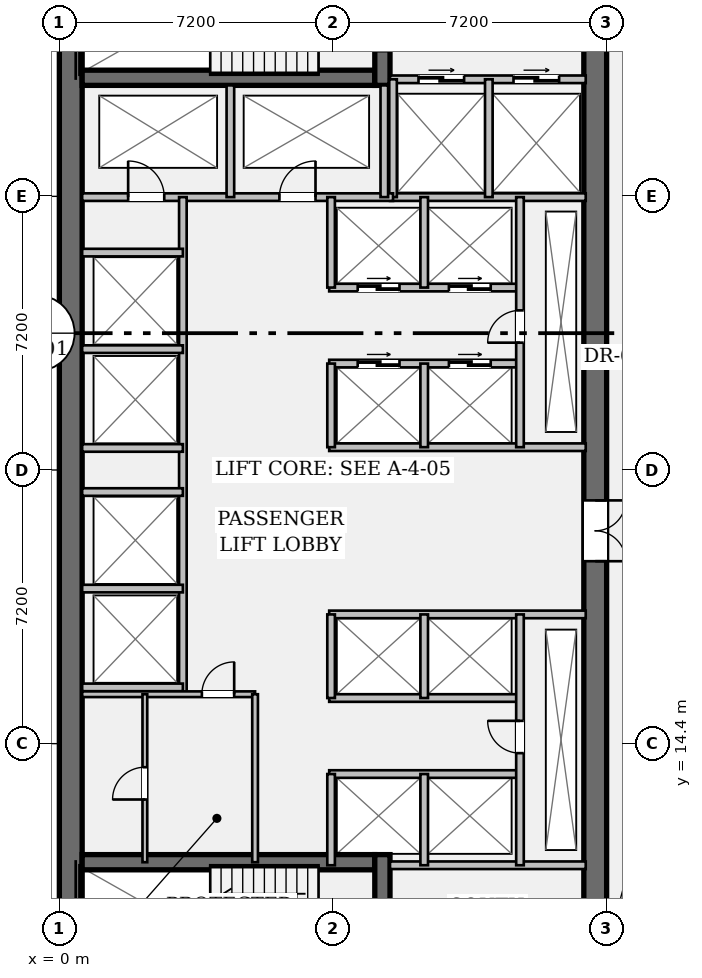
"""IFC4 building model, lengths in metres.
Left out: names, types, materials, properties, quantities, classifications, styles, units other than length and angle.
Written with IfcOpenShell. Run it as: python <this file> out.ifc"""

import sys

from ifc_helpers import new_model, si_unit, direction, frame, frame_2d, origin, place, context, subcontext, project, spatial, rectangle, extrude, element, fill, save


model = new_model("IFC4")
c1 = context("Model", 3, precision=1e-05, world=origin(), true_north=direction((0.0, 1.0)))
c2 = subcontext(c1, "Body", "Model", "MODEL_VIEW")
j1 = project(units=[si_unit("LENGTHUNIT", "METRE"), si_unit("PLANEANGLEUNIT", "RADIAN")], contexts=[c1])
p1 = place(None, origin())
s1 = spatial("IfcSite", under=j1, at=p1, CompositionType="ELEMENT")
p2 = place(p1, origin())
s2 = spatial("IfcBuilding", under=s1, at=p2, CompositionType="ELEMENT")
p3 = place(p2, frame((0.0, 0.0, 69.65)))
s3 = spatial("IfcBuildingStorey", under=s2, at=p3, CompositionType="ELEMENT", Elevation=69.65)
p4 = place(p3, frame((0.3, 7.2, 0.0), z_axis=(0.0, 0.0, 1.0), x_axis=(0.0, 1.0, 0.0)))
e1 = element("IfcWall", 1, at=p4, inside=s3, PredefinedType="SHEAR", context=c2, shape_type="SweptSolid", body=[
    extrude(rectangle(XDim=28.8, YDim=0.6, at=frame_2d((14.4, 0.0))), origin(), (0.0, 0.0, 1.0), 3.57),
])
p5 = place(p3, frame((14.1, 35.4, 0.0), z_axis=(0.0, 0.0, 1.0), x_axis=(0.0, -1.0, 0.0)))
e2 = element("IfcWall", 2, at=p5, inside=s3, PredefinedType="SHEAR", context=c2, shape_type="SweptSolid", body=[
    extrude(rectangle(XDim=27.6, YDim=0.6, at=frame_2d((13.8, 0.0))), origin(), (0.0, 0.0, 1.0), 3.57),
])
p6 = place(p5, frame((1.3, 0.0, 0.0)))
e3 = element("IfcOpeningElement", 3, at=p6, cuts=e2, PredefinedType="OPENING", context=c2, shape_type="SweptSolid", body=[
    extrude(rectangle(XDim=1.2, YDim=2.15, at=frame_2d((0.6, 1.075))), frame((0.0, 0.312, 0.0), z_axis=(0.0, -1.0, 0.0), x_axis=(1.0, 0.0, 0.0)), (0.0, 0.0, 1.0), 0.624),
])
p7 = place(p5, frame((25.25, 0.0, 0.0)))
e4 = element("IfcOpeningElement", 4, at=p7, cuts=e2, PredefinedType="OPENING", context=c2, shape_type="SweptSolid", body=[
    extrude(rectangle(XDim=1.2, YDim=2.15, at=frame_2d((0.6, 1.075))), frame((0.0, 0.312, 0.0), z_axis=(0.0, -1.0, 0.0), x_axis=(1.0, 0.0, 0.0)), (0.0, 0.0, 1.0), 0.624),
])
p8 = place(p5, frame((14.6, 0.0, 0.0)))
e5 = element("IfcOpeningElement", 5, at=p8, cuts=e2, PredefinedType="OPENING", context=c2, shape_type="SweptSolid", body=[
    extrude(rectangle(XDim=1.6, YDim=2.2, at=frame_2d((0.8, 1.1))), frame((0.0, 0.312, 0.0), z_axis=(0.0, -1.0, 0.0), x_axis=(1.0, 0.0, 0.0)), (0.0, 0.0, 1.0), 0.624),
])
for number, where, z_axis, x_axis in (
    (6, (0.6, 31.92, 0.0), (0.0, 0.0, 1.0), (1.0, 0.0, 0.0)),
    (7, (0.6, 11.28, 0.0), (0.0, 0.0, 1.0), (1.0, 0.0, 0.0)),
):
    element("IfcWall", number, at=place(p3, frame(where, z_axis=z_axis, x_axis=x_axis)), inside=s3, PredefinedType="SHEAR", context=c2, shape_type="SweptSolid", body=[
        extrude(rectangle(XDim=7.7, YDim=0.4, at=frame_2d((3.85, 0.0))), origin(), (0.0, 0.0, 1.0), 3.57),
    ])
p9 = place(p3, frame((8.5, 31.72, 0.0), z_axis=(0.0, 0.0, 1.0), x_axis=(0.0, 1.0, 0.0)))
e8 = element("IfcWall", 8, at=p9, inside=s3, PredefinedType="SHEAR", context=c2, shape_type="SweptSolid", body=[
    extrude(rectangle(XDim=3.68, YDim=0.4, at=frame_2d((1.84, 0.0))), origin(), (0.0, 0.0, 1.0), 3.57),
])
p10 = place(p9, frame((0.9, 0.0, 0.0)))
e9 = element("IfcOpeningElement", 9, at=p10, cuts=e8, PredefinedType="OPENING", context=c2, shape_type="SweptSolid", body=[
    extrude(rectangle(XDim=1.1, YDim=2.15, at=frame_2d((0.55, 1.075))), frame((0.0, 0.212, 0.0), z_axis=(0.0, -1.0, 0.0), x_axis=(1.0, 0.0, 0.0)), (0.0, 0.0, 1.0), 0.424),
])
p11 = place(p3, frame((8.5, 7.8, 0.0), z_axis=(0.0, 0.0, 1.0), x_axis=(0.0, 1.0, 0.0)))
e10 = element("IfcWall", 10, at=p11, inside=s3, PredefinedType="SHEAR", context=c2, shape_type="SweptSolid", body=[
    extrude(rectangle(XDim=3.68, YDim=0.4, at=frame_2d((1.84, 0.0))), origin(), (0.0, 0.0, 1.0), 3.57),
])
p12 = place(p11, frame((0.85, 0.0, 0.0)))
e11 = element("IfcOpeningElement", 11, at=p12, cuts=e10, PredefinedType="OPENING", context=c2, shape_type="SweptSolid", body=[
    extrude(rectangle(XDim=1.1, YDim=2.15, at=frame_2d((0.55, 1.075))), frame((0.0, 0.212, 0.0), z_axis=(0.0, -1.0, 0.0), x_axis=(1.0, 0.0, 0.0)), (0.0, 0.0, 1.0), 0.424),
])
p13 = place(p3, frame((8.7, 31.88, 0.0), z_axis=(0.0, 0.0, 1.0), x_axis=(1.0, 0.0, 0.0)))
e12 = element("IfcWall", 12, at=p13, inside=s3, PredefinedType="PARTITIONING", context=c2, shape_type="SweptSolid", body=[
    extrude(rectangle(XDim=5.15, YDim=0.2, at=frame_2d((2.575, 0.0))), origin(), (0.0, 0.0, 1.0), 3.57),
])
p14 = place(p13, frame((0.75, 0.0, 0.0)))
e13 = element("IfcOpeningElement", 13, at=p14, cuts=e12, PredefinedType="OPENING", context=c2, shape_type="SweptSolid", body=[
    extrude(rectangle(XDim=1.2, YDim=2.2, at=frame_2d((0.6, 1.1))), frame((0.0, 0.112, 0.0), z_axis=(0.0, -1.0, 0.0), x_axis=(1.0, 0.0, 0.0)), (0.0, 0.0, 1.0), 0.224),
])
p15 = place(p13, frame((3.25, 0.0, 0.0)))
e14 = element("IfcOpeningElement", 14, at=p15, cuts=e12, PredefinedType="OPENING", context=c2, shape_type="SweptSolid", body=[
    extrude(rectangle(XDim=1.2, YDim=2.2, at=frame_2d((0.6, 1.1))), frame((0.0, 0.112, 0.0), z_axis=(0.0, -1.0, 0.0), x_axis=(1.0, 0.0, 0.0)), (0.0, 0.0, 1.0), 0.224),
])
for number, where, z_axis, x_axis in (
    (15, (8.7, 11.2, 0.0), (0.0, 0.0, 1.0), (1.0, 0.0, 0.0)),
    (16, (8.7, 28.78, 0.0), (0.0, 0.0, 1.0), (1.0, 0.0, 0.0)),
):
    element("IfcWall", number, at=place(p3, frame(where, z_axis=z_axis, x_axis=x_axis)), inside=s3, PredefinedType="PARTITIONING", context=c2, shape_type="SweptSolid", body=[
        extrude(rectangle(XDim=5.15, YDim=0.2, at=frame_2d((2.575, 0.0))), origin(), (0.0, 0.0, 1.0), 3.57),
    ])
for number, where, z_axis, x_axis in (
    (17, (8.78, 28.78, 0.0), (0.0, 0.0, 1.0), (0.0, 1.0, 0.0)),
    (18, (11.3, 28.78, 0.0), (0.0, 0.0, 1.0), (0.0, 1.0, 0.0)),
):
    element("IfcWall", number, at=place(p3, frame(where, z_axis=z_axis, x_axis=x_axis)), inside=s3, PredefinedType="PARTITIONING", context=c2, shape_type="SweptSolid", body=[
        extrude(rectangle(XDim=3.1, YDim=0.2, at=frame_2d((1.55, 0.0))), origin(), (0.0, 0.0, 1.0), 3.57),
    ])
p16 = place(p3, frame((0.6, 28.78, 0.0), z_axis=(0.0, 0.0, 1.0), x_axis=(1.0, 0.0, 0.0)))
e19 = element("IfcWall", 19, at=p16, inside=s3, PredefinedType="PARTITIONING", context=c2, shape_type="SweptSolid", body=[
    extrude(rectangle(XDim=8.18, YDim=0.2, at=frame_2d((4.09, 0.0))), origin(), (0.0, 0.0, 1.0), 3.57),
])
p17 = place(p16, frame((1.21, 0.0, 0.0)))
e20 = element("IfcOpeningElement", 20, at=p17, cuts=e19, PredefinedType="OPENING", context=c2, shape_type="SweptSolid", body=[
    extrude(rectangle(XDim=0.95, YDim=2.15, at=frame_2d((0.475, 1.075))), frame((0.0, 0.112, 0.0), z_axis=(0.0, -1.0, 0.0), x_axis=(1.0, 0.0, 0.0)), (0.0, 0.0, 1.0), 0.224),
])
p18 = place(p16, frame((5.19, 0.0, 0.0)))
e21 = element("IfcOpeningElement", 21, at=p18, cuts=e19, PredefinedType="OPENING", context=c2, shape_type="SweptSolid", body=[
    extrude(rectangle(XDim=0.95, YDim=2.15, at=frame_2d((0.475, 1.075))), frame((0.0, 0.112, 0.0), z_axis=(0.0, -1.0, 0.0), x_axis=(1.0, 0.0, 0.0)), (0.0, 0.0, 1.0), 0.224),
])
for number, where, z_axis, x_axis in (
    (22, (4.5, 28.78, 0.0), (0.0, 0.0, 1.0), (0.0, 1.0, 0.0)),
    (23, (8.55, 28.78, 0.0), (0.0, 0.0, 1.0), (0.0, 1.0, 0.0)),
):
    element("IfcWall", number, at=place(p3, frame(where, z_axis=z_axis, x_axis=x_axis)), inside=s3, PredefinedType="PARTITIONING", context=c2, shape_type="SweptSolid", body=[
        extrude(rectangle(XDim=2.94, YDim=0.2, at=frame_2d((1.47, 0.0))), origin(), (0.0, 0.0, 1.0), 3.57),
    ])
p19 = place(p3, frame((3.25, 15.7, 0.0), z_axis=(0.0, 0.0, 1.0), x_axis=(0.0, 1.0, 0.0)))
e24 = element("IfcWall", 24, at=p19, inside=s3, PredefinedType="PARTITIONING", context=c2, shape_type="SweptSolid", body=[
    extrude(rectangle(XDim=13.08, YDim=0.2, at=frame_2d((6.54, 0.0))), origin(), (0.0, 0.0, 1.0), 3.57),
])
for number, where, z_axis, x_axis in (
    (25, (0.6, 15.88, 0.0), (0.0, 0.0, 1.0), (1.0, 0.0, 0.0)),
    (26, (0.6, 18.48, 0.0), (0.0, 0.0, 1.0), (1.0, 0.0, 0.0)),
    (27, (0.6, 22.18, 0.0), (0.0, 0.0, 1.0), (1.0, 0.0, 0.0)),
    (28, (0.6, 24.78, 0.0), (0.0, 0.0, 1.0), (1.0, 0.0, 0.0)),
    (29, (0.6, 21.02, 0.0), (0.0, 0.0, 1.0), (1.0, 0.0, 0.0)),
    (30, (0.6, 27.32, 0.0), (0.0, 0.0, 1.0), (1.0, 0.0, 0.0)),
):
    element("IfcWall", number, at=place(p3, frame(where, z_axis=z_axis, x_axis=x_axis)), inside=s3, PredefinedType="PARTITIONING", context=c2, shape_type="SweptSolid", body=[
        extrude(rectangle(XDim=2.65, YDim=0.2, at=frame_2d((1.325, 0.0))), origin(), (0.0, 0.0, 1.0), 3.57),
    ])
p20 = place(p3, frame((7.1, 22.2, 0.0), z_axis=(0.0, 0.0, 1.0), x_axis=(1.0, 0.0, 0.0)))
e31 = element("IfcWall", 31, at=p20, inside=s3, PredefinedType="PARTITIONING", context=c2, shape_type="SweptSolid", body=[
    extrude(rectangle(XDim=6.75, YDim=0.2, at=frame_2d((3.375, 0.0))), origin(), (0.0, 0.0, 1.0), 3.57),
])
p21 = place(p3, frame((7.1, 24.4, 0.0), z_axis=(0.0, 0.0, 1.0), x_axis=(1.0, 0.0, 0.0)))
e32 = element("IfcWall", 32, at=p21, inside=s3, PredefinedType="PARTITIONING", context=c2, shape_type="SweptSolid", body=[
    extrude(rectangle(XDim=5.02, YDim=0.2, at=frame_2d((2.51, 0.0))), origin(), (0.0, 0.0, 1.0), 3.57),
])
p22 = place(p21, frame((0.75, 0.0, 0.0)))
e33 = element("IfcOpeningElement", 33, at=p22, cuts=e32, PredefinedType="OPENING", context=c2, shape_type="SweptSolid", body=[
    extrude(rectangle(XDim=1.1, YDim=2.2, at=frame_2d((0.55, 1.1))), frame((0.0, 0.112, 0.0), z_axis=(0.0, -1.0, 0.0), x_axis=(1.0, 0.0, 0.0)), (0.0, 0.0, 1.0), 0.224),
])
p23 = place(p21, frame((3.15, 0.0, 0.0)))
e34 = element("IfcOpeningElement", 34, at=p23, cuts=e32, PredefinedType="OPENING", context=c2, shape_type="SweptSolid", body=[
    extrude(rectangle(XDim=1.1, YDim=2.2, at=frame_2d((0.55, 1.1))), frame((0.0, 0.112, 0.0), z_axis=(0.0, -1.0, 0.0), x_axis=(1.0, 0.0, 0.0)), (0.0, 0.0, 1.0), 0.224),
])
p24 = place(p3, frame((7.1, 26.4, 0.0), z_axis=(0.0, 0.0, 1.0), x_axis=(1.0, 0.0, 0.0)))
e35 = element("IfcWall", 35, at=p24, inside=s3, PredefinedType="PARTITIONING", context=c2, shape_type="SweptSolid", body=[
    extrude(rectangle(XDim=5.02, YDim=0.2, at=frame_2d((2.51, 0.0))), origin(), (0.0, 0.0, 1.0), 3.57),
])
p25 = place(p24, frame((0.75, 0.0, 0.0)))
e36 = element("IfcOpeningElement", 36, at=p25, cuts=e35, PredefinedType="OPENING", context=c2, shape_type="SweptSolid", body=[
    extrude(rectangle(XDim=1.1, YDim=2.2, at=frame_2d((0.55, 1.1))), frame((0.0, 0.112, 0.0), z_axis=(0.0, -1.0, 0.0), x_axis=(1.0, 0.0, 0.0)), (0.0, 0.0, 1.0), 0.224),
])
p26 = place(p24, frame((3.15, 0.0, 0.0)))
e37 = element("IfcOpeningElement", 37, at=p26, cuts=e35, PredefinedType="OPENING", context=c2, shape_type="SweptSolid", body=[
    extrude(rectangle(XDim=1.1, YDim=2.2, at=frame_2d((0.55, 1.1))), frame((0.0, 0.112, 0.0), z_axis=(0.0, -1.0, 0.0), x_axis=(1.0, 0.0, 0.0)), (0.0, 0.0, 1.0), 0.224),
])
p27 = place(p3, frame((7.15, 22.2, 0.0), z_axis=(0.0, 0.0, 1.0), x_axis=(0.0, 1.0, 0.0)))
e38 = element("IfcWall", 38, at=p27, inside=s3, PredefinedType="PARTITIONING", context=c2, shape_type="SweptSolid", body=[
    extrude(rectangle(XDim=2.2, YDim=0.2, at=frame_2d((1.1, 0.0))), origin(), (0.0, 0.0, 1.0), 3.57),
])
p28 = place(p3, frame((7.15, 26.4, 0.0), z_axis=(0.0, 0.0, 1.0), x_axis=(0.0, 1.0, 0.0)))
e39 = element("IfcWall", 39, at=p28, inside=s3, PredefinedType="PARTITIONING", context=c2, shape_type="SweptSolid", body=[
    extrude(rectangle(XDim=2.38, YDim=0.2, at=frame_2d((1.19, 0.0))), origin(), (0.0, 0.0, 1.0), 3.57),
])
p29 = place(p3, frame((9.6, 22.2, 0.0), z_axis=(0.0, 0.0, 1.0), x_axis=(0.0, 1.0, 0.0)))
e40 = element("IfcWall", 40, at=p29, inside=s3, PredefinedType="PARTITIONING", context=c2, shape_type="SweptSolid", body=[
    extrude(rectangle(XDim=2.2, YDim=0.2, at=frame_2d((1.1, 0.0))), origin(), (0.0, 0.0, 1.0), 3.57),
])
p30 = place(p3, frame((9.6, 26.4, 0.0), z_axis=(0.0, 0.0, 1.0), x_axis=(0.0, 1.0, 0.0)))
e41 = element("IfcWall", 41, at=p30, inside=s3, PredefinedType="PARTITIONING", context=c2, shape_type="SweptSolid", body=[
    extrude(rectangle(XDim=2.38, YDim=0.2, at=frame_2d((1.19, 0.0))), origin(), (0.0, 0.0, 1.0), 3.57),
])
p31 = place(p3, frame((12.12, 22.2, 0.0), z_axis=(0.0, 0.0, 1.0), x_axis=(0.0, 1.0, 0.0)))
e42 = element("IfcWall", 42, at=p31, inside=s3, PredefinedType="PARTITIONING", context=c2, shape_type="SweptSolid", body=[
    extrude(rectangle(XDim=6.58, YDim=0.2, at=frame_2d((3.29, 0.0))), origin(), (0.0, 0.0, 1.0), 3.57),
])
p32 = place(p31, frame((2.75, 0.0, 0.0)))
e43 = element("IfcOpeningElement", 43, at=p32, cuts=e42, PredefinedType="OPENING", context=c2, shape_type="SweptSolid", body=[
    extrude(rectangle(XDim=0.85, YDim=2.15, at=frame_2d((0.425, 1.075))), frame((0.0, 0.112, 0.0), z_axis=(0.0, -1.0, 0.0), x_axis=(1.0, 0.0, 0.0)), (0.0, 0.0, 1.0), 0.224),
])
p33 = place(p3, frame((7.1, 17.8, 0.0), z_axis=(0.0, 0.0, 1.0), x_axis=(1.0, 0.0, 0.0)))
e44 = element("IfcWall", 44, at=p33, inside=s3, PredefinedType="PARTITIONING", context=c2, shape_type="SweptSolid", body=[
    extrude(rectangle(XDim=6.75, YDim=0.2, at=frame_2d((3.375, 0.0))), origin(), (0.0, 0.0, 1.0), 3.57),
])
for number, where, z_axis, x_axis in (
    (45, (7.1, 15.6, 0.0), (0.0, 0.0, 1.0), (1.0, 0.0, 0.0)),
    (46, (7.1, 13.6, 0.0), (0.0, 0.0, 1.0), (1.0, 0.0, 0.0)),
):
    element("IfcWall", number, at=place(p3, frame(where, z_axis=z_axis, x_axis=x_axis)), inside=s3, PredefinedType="PARTITIONING", context=c2, shape_type="SweptSolid", body=[
        extrude(rectangle(XDim=5.02, YDim=0.2, at=frame_2d((2.51, 0.0))), origin(), (0.0, 0.0, 1.0), 3.57),
    ])
p34 = place(p3, frame((7.15, 15.6, 0.0), z_axis=(0.0, 0.0, 1.0), x_axis=(0.0, 1.0, 0.0)))
e47 = element("IfcWall", 47, at=p34, inside=s3, PredefinedType="PARTITIONING", context=c2, shape_type="SweptSolid", body=[
    extrude(rectangle(XDim=2.2, YDim=0.2, at=frame_2d((1.1, 0.0))), origin(), (0.0, 0.0, 1.0), 3.57),
])
p35 = place(p3, frame((7.15, 11.2, 0.0), z_axis=(0.0, 0.0, 1.0), x_axis=(0.0, 1.0, 0.0)))
e48 = element("IfcWall", 48, at=p35, inside=s3, PredefinedType="PARTITIONING", context=c2, shape_type="SweptSolid", body=[
    extrude(rectangle(XDim=2.4, YDim=0.2, at=frame_2d((1.2, 0.0))), origin(), (0.0, 0.0, 1.0), 3.57),
])
p36 = place(p3, frame((9.6, 15.6, 0.0), z_axis=(0.0, 0.0, 1.0), x_axis=(0.0, 1.0, 0.0)))
e49 = element("IfcWall", 49, at=p36, inside=s3, PredefinedType="PARTITIONING", context=c2, shape_type="SweptSolid", body=[
    extrude(rectangle(XDim=2.2, YDim=0.2, at=frame_2d((1.1, 0.0))), origin(), (0.0, 0.0, 1.0), 3.57),
])
p37 = place(p3, frame((9.6, 11.2, 0.0), z_axis=(0.0, 0.0, 1.0), x_axis=(0.0, 1.0, 0.0)))
e50 = element("IfcWall", 50, at=p37, inside=s3, PredefinedType="PARTITIONING", context=c2, shape_type="SweptSolid", body=[
    extrude(rectangle(XDim=2.4, YDim=0.2, at=frame_2d((1.2, 0.0))), origin(), (0.0, 0.0, 1.0), 3.57),
])
p38 = place(p3, frame((12.12, 11.2, 0.0), z_axis=(0.0, 0.0, 1.0), x_axis=(0.0, 1.0, 0.0)))
e51 = element("IfcWall", 51, at=p38, inside=s3, PredefinedType="PARTITIONING", context=c2, shape_type="SweptSolid", body=[
    extrude(rectangle(XDim=6.6, YDim=0.2, at=frame_2d((3.3, 0.0))), origin(), (0.0, 0.0, 1.0), 3.57),
])
p39 = place(p38, frame((2.95, 0.0, 0.0)))
e52 = element("IfcOpeningElement", 52, at=p39, cuts=e51, PredefinedType="OPENING", context=c2, shape_type="SweptSolid", body=[
    extrude(rectangle(XDim=0.85, YDim=2.15, at=frame_2d((0.425, 1.075))), frame((0.0, 0.112, 0.0), z_axis=(0.0, -1.0, 0.0), x_axis=(1.0, 0.0, 0.0)), (0.0, 0.0, 1.0), 0.224),
])
p40 = place(p3, frame((0.6, 15.7, 0.0), z_axis=(0.0, 0.0, 1.0), x_axis=(1.0, 0.0, 0.0)))
e53 = element("IfcWall", 53, at=p40, inside=s3, PredefinedType="PARTITIONING", context=c2, shape_type="SweptSolid", body=[
    extrude(rectangle(XDim=4.55, YDim=0.15, at=frame_2d((2.275, 0.0))), origin(), (0.0, 0.0, 1.0), 3.57),
])
p41 = place(p40, frame((3.15, 0.0, 0.0)))
e54 = element("IfcOpeningElement", 54, at=p41, cuts=e53, PredefinedType="OPENING", context=c2, shape_type="SweptSolid", body=[
    extrude(rectangle(XDim=0.85, YDim=2.15, at=frame_2d((0.425, 1.075))), frame((0.0, 0.087, 0.0), z_axis=(0.0, -1.0, 0.0), x_axis=(1.0, 0.0, 0.0)), (0.0, 0.0, 1.0), 0.174),
])
p42 = place(p3, frame((5.15, 11.28, 0.0), z_axis=(0.0, 0.0, 1.0), x_axis=(0.0, 1.0, 0.0)))
e55 = element("IfcWall", 55, at=p42, inside=s3, PredefinedType="PARTITIONING", context=c2, shape_type="SweptSolid", body=[
    extrude(rectangle(XDim=4.42, YDim=0.15, at=frame_2d((2.21, 0.0))), origin(), (0.0, 0.0, 1.0), 3.57),
])
p43 = place(p3, frame((2.25, 11.28, 0.0), z_axis=(0.0, 0.0, 1.0), x_axis=(0.0, 1.0, 0.0)))
e56 = element("IfcWall", 56, at=p43, inside=s3, PredefinedType="PARTITIONING", context=c2, shape_type="SweptSolid", body=[
    extrude(rectangle(XDim=4.42, YDim=0.125, at=frame_2d((2.21, 0.0))), origin(), (0.0, 0.0, 1.0), 3.57),
])
p44 = place(p43, frame((1.65, 0.0, 0.0)))
e57 = element("IfcOpeningElement", 57, at=p44, cuts=e56, PredefinedType="OPENING", context=c2, shape_type="SweptSolid", body=[
    extrude(rectangle(XDim=0.85, YDim=2.15, at=frame_2d((0.425, 1.075))), frame((0.0, 0.074, 0.0), z_axis=(0.0, -1.0, 0.0), x_axis=(1.0, 0.0, 0.0)), (0.0, 0.0, 1.0), 0.149),
])
p45 = place(p14, origin())
e58 = element("IfcDoor", 58, at=p45, inside=s3, OperationType="DOUBLE_DOOR_SLIDING", PredefinedType="DOOR", context=c2, shape_type="SweptSolid", body=[
    extrude(rectangle(XDim=1.2, YDim=2.2, at=frame_2d((0.6, 1.1))), frame((0.0, 0.025, 0.0), z_axis=(0.0, -1.0, 0.0), x_axis=(1.0, 0.0, 0.0)), (0.0, 0.0, 1.0), 0.05),
])
fill(e13, e58)
p46 = place(p15, origin())
e59 = element("IfcDoor", 59, at=p46, inside=s3, OperationType="DOUBLE_DOOR_SLIDING", PredefinedType="DOOR", context=c2, shape_type="SweptSolid", body=[
    extrude(rectangle(XDim=1.2, YDim=2.2, at=frame_2d((0.6, 1.1))), frame((0.0, 0.025, 0.0), z_axis=(0.0, -1.0, 0.0), x_axis=(1.0, 0.0, 0.0)), (0.0, 0.0, 1.0), 0.05),
])
fill(e14, e59)
p47 = place(p17, origin())
e60 = element("IfcDoor", 60, at=p47, inside=s3, OperationType="SINGLE_SWING_LEFT", PredefinedType="DOOR", context=c2, shape_type="SweptSolid", body=[
    extrude(rectangle(XDim=0.95, YDim=2.15, at=frame_2d((0.475, 1.075))), frame((0.0, 0.025, 0.0), z_axis=(0.0, -1.0, 0.0), x_axis=(1.0, 0.0, 0.0)), (0.0, 0.0, 1.0), 0.05),
])
fill(e20, e60)
p48 = place(p18, origin())
e61 = element("IfcDoor", 61, at=p48, inside=s3, OperationType="SINGLE_SWING_RIGHT", PredefinedType="DOOR", context=c2, shape_type="SweptSolid", body=[
    extrude(rectangle(XDim=0.95, YDim=2.15, at=frame_2d((0.475, 1.075))), frame((0.0, 0.025, 0.0), z_axis=(0.0, -1.0, 0.0), x_axis=(1.0, 0.0, 0.0)), (0.0, 0.0, 1.0), 0.05),
])
fill(e21, e61)
p49 = place(p8, origin())
e62 = element("IfcDoor", 62, at=p49, inside=s3, OperationType="DOUBLE_DOOR_SINGLE_SWING", PredefinedType="DOOR", context=c2, shape_type="SweptSolid", body=[
    extrude(rectangle(XDim=1.6, YDim=2.2, at=frame_2d((0.8, 1.1))), frame((0.0, 0.025, 0.0), z_axis=(0.0, -1.0, 0.0), x_axis=(1.0, 0.0, 0.0)), (0.0, 0.0, 1.0), 0.05),
])
fill(e5, e62)
p50 = place(p32, origin())
e63 = element("IfcDoor", 63, at=p50, inside=s3, OperationType="SINGLE_SWING_LEFT", PredefinedType="DOOR", context=c2, shape_type="SweptSolid", body=[
    extrude(rectangle(XDim=0.85, YDim=2.15, at=frame_2d((0.425, 1.075))), frame((0.0, 0.025, 0.0), z_axis=(0.0, -1.0, 0.0), x_axis=(1.0, 0.0, 0.0)), (0.0, 0.0, 1.0), 0.05),
])
fill(e43, e63)
p51 = place(p22, origin())
e64 = element("IfcDoor", 64, at=p51, inside=s3, OperationType="DOUBLE_DOOR_SLIDING", PredefinedType="DOOR", context=c2, shape_type="SweptSolid", body=[
    extrude(rectangle(XDim=1.1, YDim=2.2, at=frame_2d((0.55, 1.1))), frame((0.0, 0.025, 0.0), z_axis=(0.0, -1.0, 0.0), x_axis=(1.0, 0.0, 0.0)), (0.0, 0.0, 1.0), 0.05),
])
fill(e33, e64)
p52 = place(p23, origin())
e65 = element("IfcDoor", 65, at=p52, inside=s3, OperationType="DOUBLE_DOOR_SLIDING", PredefinedType="DOOR", context=c2, shape_type="SweptSolid", body=[
    extrude(rectangle(XDim=1.1, YDim=2.2, at=frame_2d((0.55, 1.1))), frame((0.0, 0.025, 0.0), z_axis=(0.0, -1.0, 0.0), x_axis=(1.0, 0.0, 0.0)), (0.0, 0.0, 1.0), 0.05),
])
fill(e34, e65)
p53 = place(p25, origin())
e66 = element("IfcDoor", 66, at=p53, inside=s3, OperationType="DOUBLE_DOOR_SLIDING", PredefinedType="DOOR", context=c2, shape_type="SweptSolid", body=[
    extrude(rectangle(XDim=1.1, YDim=2.2, at=frame_2d((0.55, 1.1))), frame((0.0, 0.025, 0.0), z_axis=(0.0, -1.0, 0.0), x_axis=(1.0, 0.0, 0.0)), (0.0, 0.0, 1.0), 0.05),
])
fill(e36, e66)
p54 = place(p26, origin())
e67 = element("IfcDoor", 67, at=p54, inside=s3, OperationType="DOUBLE_DOOR_SLIDING", PredefinedType="DOOR", context=c2, shape_type="SweptSolid", body=[
    extrude(rectangle(XDim=1.1, YDim=2.2, at=frame_2d((0.55, 1.1))), frame((0.0, 0.025, 0.0), z_axis=(0.0, -1.0, 0.0), x_axis=(1.0, 0.0, 0.0)), (0.0, 0.0, 1.0), 0.05),
])
fill(e37, e67)
p55 = place(p39, origin())
e68 = element("IfcDoor", 68, at=p55, inside=s3, OperationType="SINGLE_SWING_RIGHT", PredefinedType="DOOR", context=c2, shape_type="SweptSolid", body=[
    extrude(rectangle(XDim=0.85, YDim=2.15, at=frame_2d((0.425, 1.075))), frame((0.0, 0.025, 0.0), z_axis=(0.0, -1.0, 0.0), x_axis=(1.0, 0.0, 0.0)), (0.0, 0.0, 1.0), 0.05),
])
fill(e52, e68)
p56 = place(p41, origin())
e69 = element("IfcDoor", 69, at=p56, inside=s3, OperationType="SINGLE_SWING_RIGHT", PredefinedType="DOOR", context=c2, shape_type="SweptSolid", body=[
    extrude(rectangle(XDim=0.85, YDim=2.15, at=frame_2d((0.425, 1.075))), frame((0.0, 0.025, 0.0), z_axis=(0.0, -1.0, 0.0), x_axis=(1.0, 0.0, 0.0)), (0.0, 0.0, 1.0), 0.05),
])
fill(e54, e69)
p57 = place(p44, origin())
e70 = element("IfcDoor", 70, at=p57, inside=s3, OperationType="SINGLE_SWING_LEFT", PredefinedType="DOOR", context=c2, shape_type="SweptSolid", body=[
    extrude(rectangle(XDim=0.85, YDim=2.15, at=frame_2d((0.425, 1.075))), frame((0.0, 0.025, 0.0), z_axis=(0.0, -1.0, 0.0), x_axis=(1.0, 0.0, 0.0)), (0.0, 0.0, 1.0), 0.05),
])
fill(e57, e70)
save(model, sys.argv[1])
